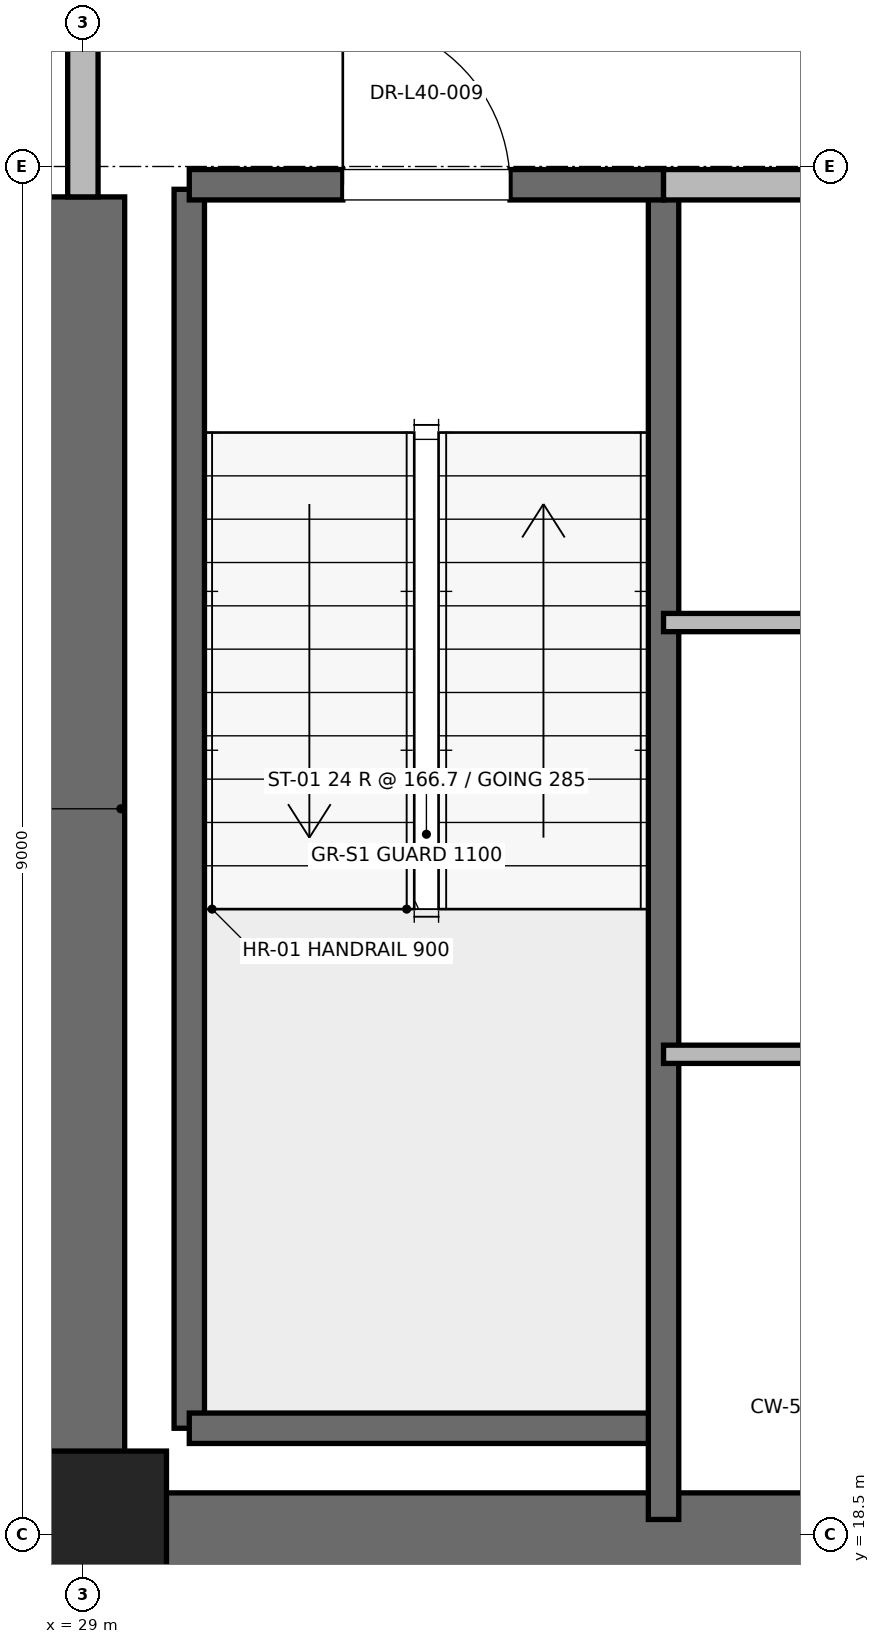
"""IFC4 building model, lengths in metres.
Left out: names, types, materials, properties, quantities, classifications, styles, units other than length and angle.
Written with IfcOpenShell. Run it as: python <this file> out.ifc"""

import sys

from ifc_helpers import new_model, si_unit, direction, frame, frame_2d, origin, origin_2d, place, context, subcontext, project, spatial, rectangle, extrude, element, fill, save


model = new_model("IFC4")
c1 = context("Model", 3, precision=1e-05, world=origin(), true_north=direction((0.0, 1.0)))
c2 = subcontext(c1, "Body", "Model", "MODEL_VIEW")
j1 = project(units=[si_unit("LENGTHUNIT", "METRE"), si_unit("PLANEANGLEUNIT", "RADIAN")], contexts=[c1])
p1 = place(None, origin())
s1 = spatial("IfcSite", under=j1, at=p1, CompositionType="ELEMENT")
p2 = place(p1, origin())
s2 = spatial("IfcBuilding", under=s1, at=p2, CompositionType="ELEMENT")
p3 = place(p2, frame((0.0, 0.0, 172.4)))
s3 = spatial("IfcBuildingStorey", under=s2, at=p3, CompositionType="ELEMENT", Elevation=172.4)
p4 = place(p3, frame((29.0, 18.5, 0.0), z_axis=(0.0, 0.0, 1.0), x_axis=(1.0, 0.0, 0.0)))
e1 = element("IfcColumn", 1, at=p4, inside=s3, PredefinedType="PILASTER", context=c2, shape_type="SweptSolid", body=[
    extrude(rectangle(XDim=1.1, YDim=1.1, at=origin_2d()), origin(), (0.0, 0.0, 1.0), 4.0),
])
p5 = place(p3, frame((29.0, 18.5, 0.0), z_axis=(0.0, 0.0, 1.0), x_axis=(1.0, 0.0, 0.0)))
e2 = element("IfcWall", 2, at=p5, inside=s3, PredefinedType="SHEAR", context=c2, shape_type="SweptSolid", body=[
    extrude(rectangle(XDim=9.2, YDim=0.55, at=frame_2d((4.6, 0.0))), origin(), (0.0, 0.0, 1.0), 3.775),
])
p6 = place(p3, frame((29.0, 18.5, 0.0), z_axis=(0.0, 0.0, 1.0), x_axis=(0.0, 1.0, 0.0)))
e3 = element("IfcWall", 3, at=p6, inside=s3, PredefinedType="SHEAR", context=c2, shape_type="SweptSolid", body=[
    extrude(rectangle(XDim=8.8, YDim=0.55, at=frame_2d((4.4, 0.0))), origin(), (0.0, 0.0, 1.0), 3.775),
])
p7 = place(p3, frame((29.7, 19.2, 0.0), z_axis=(0.0, 0.0, 1.0), x_axis=(0.0, 1.0, 0.0)))
e4 = element("IfcWall", 4, at=p7, inside=s3, PredefinedType="SOLIDWALL", context=c2, shape_type="SweptSolid", body=[
    extrude(rectangle(XDim=8.15, YDim=0.2, at=frame_2d((4.075, 0.0))), origin(), (0.0, 0.0, 1.0), 3.775),
])
p8 = place(p3, frame((29.7, 19.2, 0.0), z_axis=(0.0, 0.0, 1.0), x_axis=(1.0, 0.0, 0.0)))
e5 = element("IfcWall", 5, at=p8, inside=s3, PredefinedType="SOLIDWALL", context=c2, shape_type="SweptSolid", body=[
    extrude(rectangle(XDim=3.12, YDim=0.2, at=frame_2d((1.56, 0.0))), origin(), (0.0, 0.0, 1.0), 3.775),
])
p9 = place(p3, frame((32.82, 18.6, 0.0), z_axis=(0.0, 0.0, 1.0), x_axis=(0.0, 1.0, 0.0)))
e6 = element("IfcWall", 6, at=p9, inside=s3, PredefinedType="SOLIDWALL", context=c2, shape_type="SweptSolid", body=[
    extrude(rectangle(XDim=8.78, YDim=0.2, at=frame_2d((4.39, 0.0))), origin(), (0.0, 0.0, 1.0), 3.775),
])
p10 = place(p3, frame((29.7, 27.38, 0.0), z_axis=(0.0, 0.0, 1.0), x_axis=(1.0, 0.0, 0.0)))
e7 = element("IfcWall", 7, at=p10, inside=s3, PredefinedType="SOLIDWALL", context=c2, shape_type="SweptSolid", body=[
    extrude(rectangle(XDim=3.12, YDim=0.2, at=frame_2d((1.56, 0.0))), origin(), (0.0, 0.0, 1.0), 3.775),
])
p11 = place(p10, frame((1.01, 0.0, 0.0)))
e8 = element("IfcOpeningElement", 8, at=p11, cuts=e7, PredefinedType="OPENING", context=c2, shape_type="SweptSolid", body=[
    extrude(rectangle(XDim=1.1, YDim=2.15, at=frame_2d((0.55, 1.075))), frame((0.0, 0.1, 0.0), z_axis=(0.0, -1.0, 0.0), x_axis=(1.0, 0.0, 0.0)), (0.0, 0.0, 1.0), 0.2),
])
p12 = place(p3, frame((29.0, 27.3, 0.0), z_axis=(0.0, 0.0, 1.0), x_axis=(0.0, 1.0, 0.0)))
e9 = element("IfcWall", 9, at=p12, inside=s3, PredefinedType="PARTITIONING", context=c2, shape_type="SweptSolid", body=[
    extrude(rectangle(XDim=3.4, YDim=0.2, at=frame_2d((1.7, 0.0))), origin(), (0.0, 0.0, 1.0), 2.755),
])
p13 = place(p12, frame((1.125, 0.0, 0.0)))
e10 = element("IfcOpeningElement", 10, at=p13, cuts=e9, PredefinedType="OPENING", context=c2, shape_type="SweptSolid", body=[
    extrude(rectangle(XDim=1.15, YDim=2.2, at=frame_2d((0.575, 1.1))), frame((0.0, 0.1, 0.0), z_axis=(0.0, -1.0, 0.0), x_axis=(1.0, 0.0, 0.0)), (0.0, 0.0, 1.0), 0.2),
])
p14 = place(p3, frame((32.82, 27.38, 0.0), z_axis=(0.0, 0.0, 1.0), x_axis=(1.0, 0.0, 0.0)))
e11 = element("IfcWall", 11, at=p14, inside=s3, PredefinedType="PARTITIONING", context=c2, shape_type="SweptSolid", body=[
    extrude(rectangle(XDim=5.62, YDim=0.2, at=frame_2d((2.81, 0.0))), origin(), (0.0, 0.0, 1.0), 3.775),
])
for number, where, z_axis, x_axis in (
    (12, (32.82, 21.66, 0.0), (0.0, 0.0, 1.0), (1.0, 0.0, 0.0)),
    (13, (32.82, 24.5, 0.0), (0.0, 0.0, 1.0), (1.0, 0.0, 0.0)),
):
    element("IfcWall", number, at=place(p3, frame(where, z_axis=z_axis, x_axis=x_axis)), inside=s3, PredefinedType="PARTITIONING", context=c2, shape_type="SweptSolid", body=[
        extrude(rectangle(XDim=5.23, YDim=0.12, at=frame_2d((2.615, 0.0))), origin(), (0.0, 0.0, 1.0), 2.85),
    ])
p15 = place(p11, origin())
e14 = element("IfcDoor", 14, at=p15, inside=s3, OperationType="SINGLE_SWING_LEFT", PredefinedType="DOOR", context=c2, shape_type="SweptSolid", body=[
    extrude(rectangle(XDim=1.1, YDim=2.15, at=frame_2d((0.55, 1.075))), frame((0.0, 0.025, 0.0), z_axis=(0.0, -1.0, 0.0), x_axis=(1.0, 0.0, 0.0)), (0.0, 0.0, 1.0), 0.05),
])
fill(e8, e14)
save(model, sys.argv[1])
